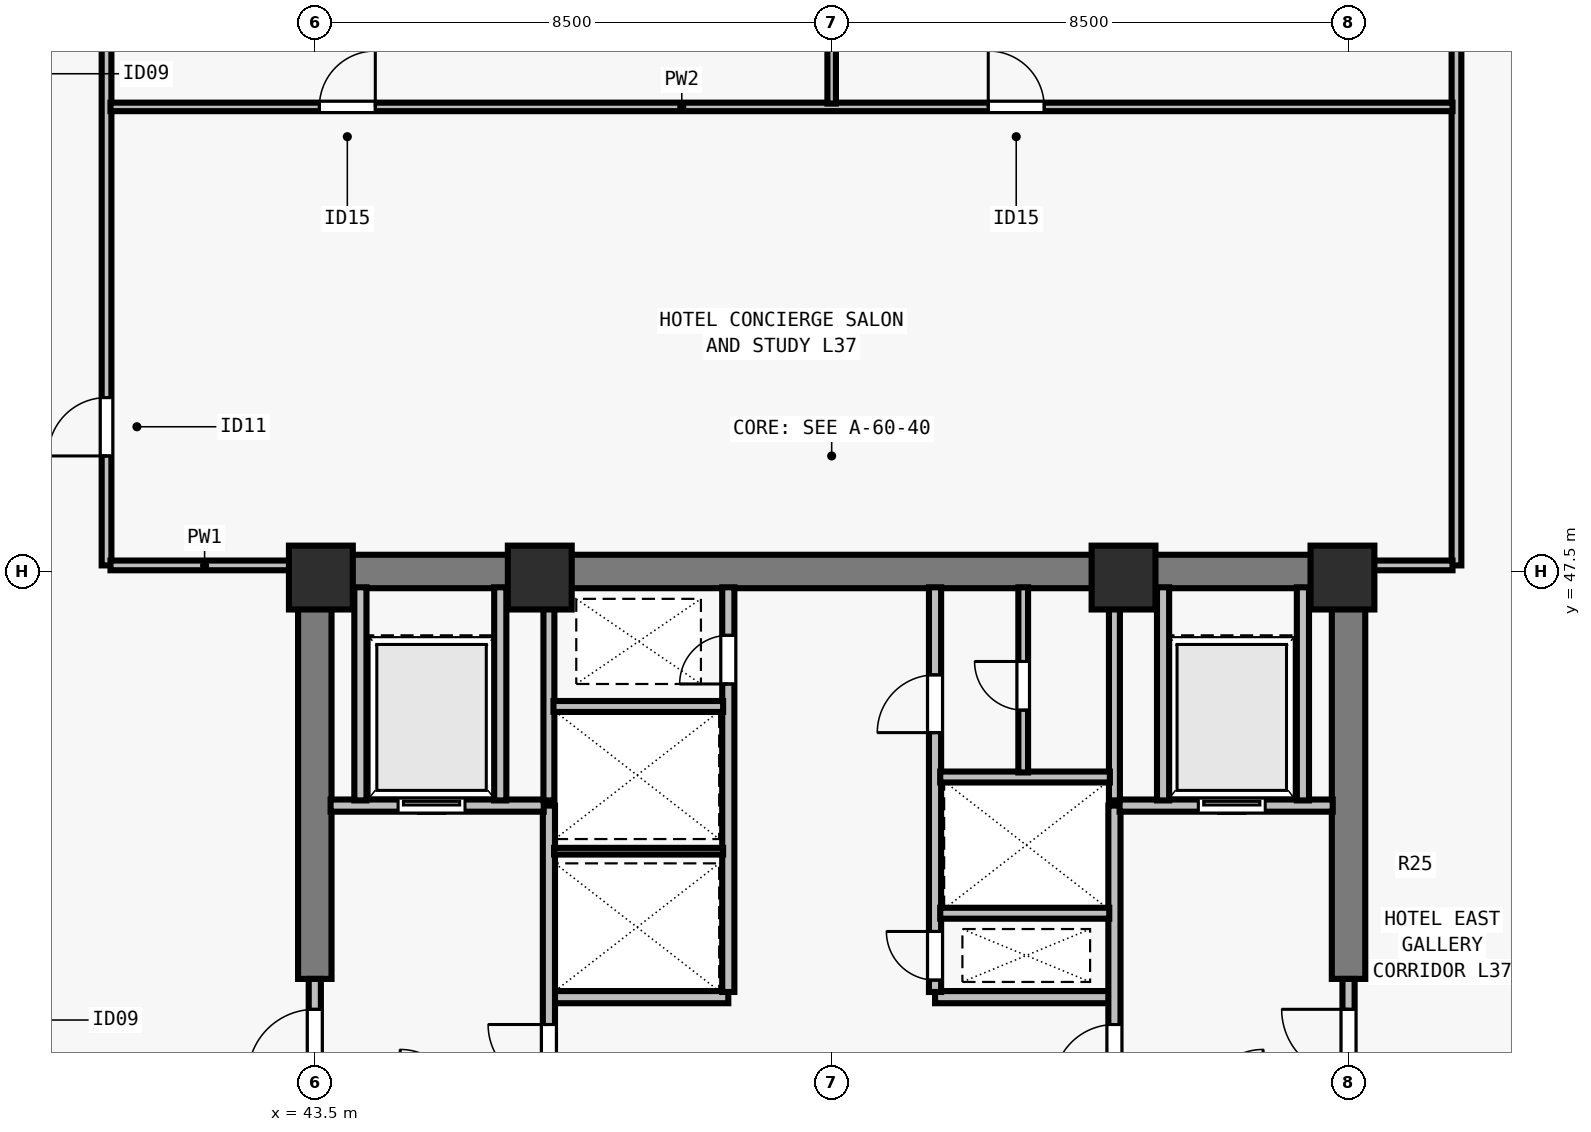
"""IFC4 building model, lengths in metres.
Left out: names, types, materials, properties, quantities, classifications, styles, units other than length and angle.
Written with IfcOpenShell. Run it as: python <this file> out.ifc"""

import sys

from ifc_helpers import new_model, si_unit, direction, frame, frame_2d, origin, origin_2d, place, context, subcontext, project, spatial, rectangle, extrude, element, fill, save


model = new_model("IFC4")
c1 = context("Model", 3, precision=1e-05, world=origin(), true_north=direction((0.0, 1.0)))
c2 = subcontext(c1, "Body", "Model", "MODEL_VIEW")
j1 = project(units=[si_unit("LENGTHUNIT", "METRE"), si_unit("PLANEANGLEUNIT", "RADIAN")], contexts=[c1])
p1 = place(None, origin())
s1 = spatial("IfcSite", under=j1, at=p1, CompositionType="ELEMENT")
p2 = place(p1, origin())
s2 = spatial("IfcBuilding", under=s1, at=p2, CompositionType="ELEMENT")
p3 = place(p2, frame((0.0, 0.0, 137.5)))
s3 = spatial("IfcBuildingStorey", under=s2, at=p3, CompositionType="ELEMENT", Elevation=137.5)
for number, where, z_axis, x_axis in (
    (1, (43.6, 47.4, 0.0), (0.0, 0.0, 1.0), (1.0, 0.0, 0.0)),
    (2, (47.2, 47.4, 0.0), (0.0, 0.0, 1.0), (1.0, 0.0, 0.0)),
    (3, (56.8, 47.4, 0.0), (0.0, 0.0, 1.0), (1.0, 0.0, 0.0)),
    (4, (60.4, 47.4, 0.0), (0.0, 0.0, 1.0), (1.0, 0.0, 0.0)),
):
    element("IfcColumn", number, at=place(p3, frame(where, z_axis=z_axis, x_axis=x_axis)), inside=s3, PredefinedType="COLUMN", context=c2, shape_type="SweptSolid", body=[
        extrude(rectangle(XDim=1.05, YDim=1.05, at=origin_2d()), origin(), (0.0, 0.0, 1.0), 3.5),
    ])
p4 = place(p3, frame((43.225, 47.5, 0.0), z_axis=(0.0, 0.0, 1.0), x_axis=(1.0, 0.0, 0.0)))
e5 = element("IfcWall", 5, at=p4, inside=s3, PredefinedType="SHEAR", context=c2, shape_type="SweptSolid", body=[
    extrude(rectangle(XDim=17.55, YDim=0.55, at=frame_2d((8.775, 0.0))), origin(), (0.0, 0.0, 1.0), 3.28),
])
for number, where, z_axis, x_axis in (
    (6, (43.5, 40.8, 0.0), (0.0, 0.0, 1.0), (0.0, 1.0, 0.0)),
    (7, (60.5, 40.8, 0.0), (0.0, 0.0, 1.0), (0.0, 1.0, 0.0)),
):
    element("IfcWall", number, at=place(p3, frame(where, z_axis=z_axis, x_axis=x_axis)), inside=s3, PredefinedType="SHEAR", context=c2, shape_type="SweptSolid", body=[
        extrude(rectangle(XDim=6.435, YDim=0.55, at=frame_2d((3.218, 0.0))), origin(), (0.0, 0.0, 1.0), 3.28),
    ])
for number, where, z_axis, x_axis in (
    (8, (47.35, 40.5, 0.0), (0.0, 0.0, 1.0), (1.0, 0.0, 0.0)),
    (9, (53.7, 40.5, 0.0), (0.0, 0.0, 1.0), (1.0, 0.0, 0.0)),
):
    element("IfcWall", number, at=place(p3, frame(where, z_axis=z_axis, x_axis=x_axis)), inside=s3, PredefinedType="SOLIDWALL", context=c2, shape_type="SweptSolid", body=[
        extrude(rectangle(XDim=2.95, YDim=0.2, at=frame_2d((1.475, 0.0))), origin(), (0.0, 0.0, 1.0), 3.28),
    ])
p5 = place(p3, frame((50.3, 40.585, 0.0), z_axis=(0.0, 0.0, 1.0), x_axis=(0.0, 1.0, 0.0)))
e10 = element("IfcWall", 10, at=p5, inside=s3, PredefinedType="SOLIDWALL", context=c2, shape_type="SweptSolid", body=[
    extrude(rectangle(XDim=6.655, YDim=0.2, at=frame_2d((3.328, 0.0))), origin(), (0.0, 0.0, 1.0), 3.28),
])
p6 = place(p5, frame((5.065, 0.0, 0.0)))
e11 = element("IfcOpeningElement", 11, at=p6, cuts=e10, PredefinedType="OPENING", context=c2, shape_type="SweptSolid", body=[
    extrude(rectangle(XDim=0.8, YDim=2.08, at=frame_2d((0.4, 1.04))), frame((0.0, 0.11, 0.0), z_axis=(0.0, -1.0, 0.0), x_axis=(1.0, 0.0, 0.0)), (0.0, 0.0, 1.0), 0.22),
])
p7 = place(p3, frame((53.7, 40.585, 0.0), z_axis=(0.0, 0.0, 1.0), x_axis=(0.0, 1.0, 0.0)))
e12 = element("IfcWall", 12, at=p7, inside=s3, PredefinedType="SOLIDWALL", context=c2, shape_type="SweptSolid", body=[
    extrude(rectangle(XDim=6.655, YDim=0.2, at=frame_2d((3.328, 0.0))), origin(), (0.0, 0.0, 1.0), 3.28),
])
p8 = place(p7, frame((0.195, 0.0, 0.0)))
e13 = element("IfcOpeningElement", 13, at=p8, cuts=e12, PredefinedType="OPENING", context=c2, shape_type="SweptSolid", body=[
    extrude(rectangle(XDim=0.8, YDim=2.08, at=frame_2d((0.4, 1.04))), frame((0.0, 0.11, 0.0), z_axis=(0.0, -1.0, 0.0), x_axis=(1.0, 0.0, 0.0)), (0.0, 0.0, 1.0), 0.22),
])
p9 = place(p7, frame((4.265, 0.0, 0.0)))
e14 = element("IfcOpeningElement", 14, at=p9, cuts=e12, PredefinedType="OPENING", context=c2, shape_type="SweptSolid", body=[
    extrude(rectangle(XDim=0.95, YDim=2.12, at=frame_2d((0.475, 1.06))), frame((0.0, 0.11, 0.0), z_axis=(0.0, -1.0, 0.0), x_axis=(1.0, 0.0, 0.0)), (0.0, 0.0, 1.0), 0.22),
])
p10 = place(p3, frame((43.5, 38.75, 0.0), z_axis=(0.0, 0.0, 1.0), x_axis=(0.0, 1.0, 0.0)))
e15 = element("IfcWall", 15, at=p10, inside=s3, PredefinedType="SOLIDWALL", context=c2, shape_type="SweptSolid", body=[
    extrude(rectangle(XDim=2.05, YDim=0.2, at=frame_2d((1.025, 0.0))), origin(), (0.0, 0.0, 1.0), 3.28),
])
p11 = place(p10, frame((0.45, 0.0, 0.0)))
e16 = element("IfcOpeningElement", 16, at=p11, cuts=e15, PredefinedType="OPENING", context=c2, shape_type="SweptSolid", body=[
    extrude(rectangle(XDim=1.1, YDim=2.15, at=frame_2d((0.55, 1.075))), frame((0.0, 0.11, 0.0), z_axis=(0.0, -1.0, 0.0), x_axis=(1.0, 0.0, 0.0)), (0.0, 0.0, 1.0), 0.22),
])
p12 = place(p3, frame((47.35, 38.785, 0.0), z_axis=(0.0, 0.0, 1.0), x_axis=(0.0, 1.0, 0.0)))
e17 = element("IfcWall", 17, at=p12, inside=s3, PredefinedType="SOLIDWALL", context=c2, shape_type="SweptSolid", body=[
    extrude(rectangle(XDim=4.865, YDim=0.2, at=frame_2d((2.433, 0.0))), origin(), (0.0, 0.0, 1.0), 3.28),
])
p13 = place(p12, frame((0.265, 0.0, 0.0)))
e18 = element("IfcOpeningElement", 18, at=p13, cuts=e17, PredefinedType="OPENING", context=c2, shape_type="SweptSolid", body=[
    extrude(rectangle(XDim=1.0, YDim=2.15, at=frame_2d((0.5, 1.075))), frame((0.0, 0.11, 0.0), z_axis=(0.0, -1.0, 0.0), x_axis=(1.0, 0.0, 0.0)), (0.0, 0.0, 1.0), 0.22),
])
p14 = place(p3, frame((43.76, 43.65, 0.0), z_axis=(0.0, 0.0, 1.0), x_axis=(1.0, 0.0, 0.0)))
e19 = element("IfcWall", 19, at=p14, inside=s3, PredefinedType="SOLIDWALL", context=c2, shape_type="SweptSolid", body=[
    extrude(rectangle(XDim=3.505, YDim=0.2, at=frame_2d((1.752, 0.0))), origin(), (0.0, 0.0, 1.0), 3.28),
])
p15 = place(p14, frame((1.11, 0.0, 0.0)))
e20 = element("IfcOpeningElement", 20, at=p15, cuts=e19, PredefinedType="OPENING", context=c2, shape_type="SweptSolid", body=[
    extrude(rectangle(XDim=1.1, YDim=2.2, at=frame_2d((0.55, 1.1))), frame((0.0, 0.11, 0.0), z_axis=(0.0, -1.0, 0.0), x_axis=(1.0, 0.0, 0.0)), (0.0, 0.0, 1.0), 0.22),
])
for number, where, z_axis, x_axis in (
    (21, (46.55, 43.735, 0.0), (0.0, 0.0, 1.0), (0.0, 1.0, 0.0)),
    (22, (44.25, 43.735, 0.0), (0.0, 0.0, 1.0), (0.0, 1.0, 0.0)),
):
    element("IfcWall", number, at=place(p3, frame(where, z_axis=z_axis, x_axis=x_axis)), inside=s3, PredefinedType="SOLIDWALL", context=c2, shape_type="SweptSolid", body=[
        extrude(rectangle(XDim=3.505, YDim=0.2, at=frame_2d((1.752, 0.0))), origin(), (0.0, 0.0, 1.0), 3.28),
    ])
p16 = place(p3, frame((60.5, 38.75, 0.0), z_axis=(0.0, 0.0, 1.0), x_axis=(0.0, 1.0, 0.0)))
e23 = element("IfcWall", 23, at=p16, inside=s3, PredefinedType="SOLIDWALL", context=c2, shape_type="SweptSolid", body=[
    extrude(rectangle(XDim=2.05, YDim=0.2, at=frame_2d((1.025, 0.0))), origin(), (0.0, 0.0, 1.0), 3.28),
])
p17 = place(p16, frame((0.45, 0.0, 0.0)))
e24 = element("IfcOpeningElement", 24, at=p17, cuts=e23, PredefinedType="OPENING", context=c2, shape_type="SweptSolid", body=[
    extrude(rectangle(XDim=1.1, YDim=2.15, at=frame_2d((0.55, 1.075))), frame((0.0, 0.11, 0.0), z_axis=(0.0, -1.0, 0.0), x_axis=(1.0, 0.0, 0.0)), (0.0, 0.0, 1.0), 0.22),
])
p18 = place(p3, frame((56.65, 38.785, 0.0), z_axis=(0.0, 0.0, 1.0), x_axis=(0.0, 1.0, 0.0)))
e25 = element("IfcWall", 25, at=p18, inside=s3, PredefinedType="SOLIDWALL", context=c2, shape_type="SweptSolid", body=[
    extrude(rectangle(XDim=4.865, YDim=0.2, at=frame_2d((2.433, 0.0))), origin(), (0.0, 0.0, 1.0), 3.28),
])
p19 = place(p18, frame((0.265, 0.0, 0.0)))
e26 = element("IfcOpeningElement", 26, at=p19, cuts=e25, PredefinedType="OPENING", context=c2, shape_type="SweptSolid", body=[
    extrude(rectangle(XDim=1.0, YDim=2.15, at=frame_2d((0.5, 1.075))), frame((0.0, 0.11, 0.0), z_axis=(0.0, -1.0, 0.0), x_axis=(1.0, 0.0, 0.0)), (0.0, 0.0, 1.0), 0.22),
])
p20 = place(p3, frame((56.735, 43.65, 0.0), z_axis=(0.0, 0.0, 1.0), x_axis=(1.0, 0.0, 0.0)))
e27 = element("IfcWall", 27, at=p20, inside=s3, PredefinedType="SOLIDWALL", context=c2, shape_type="SweptSolid", body=[
    extrude(rectangle(XDim=3.505, YDim=0.2, at=frame_2d((1.752, 0.0))), origin(), (0.0, 0.0, 1.0), 3.28),
])
p21 = place(p20, frame((1.295, 0.0, 0.0)))
e28 = element("IfcOpeningElement", 28, at=p21, cuts=e27, PredefinedType="OPENING", context=c2, shape_type="SweptSolid", body=[
    extrude(rectangle(XDim=1.1, YDim=2.2, at=frame_2d((0.55, 1.1))), frame((0.0, 0.11, 0.0), z_axis=(0.0, -1.0, 0.0), x_axis=(1.0, 0.0, 0.0)), (0.0, 0.0, 1.0), 0.22),
])
for number, where, z_axis, x_axis in (
    (29, (57.45, 43.735, 0.0), (0.0, 0.0, 1.0), (0.0, 1.0, 0.0)),
    (30, (59.75, 43.735, 0.0), (0.0, 0.0, 1.0), (0.0, 1.0, 0.0)),
):
    element("IfcWall", number, at=place(p3, frame(where, z_axis=z_axis, x_axis=x_axis)), inside=s3, PredefinedType="SOLIDWALL", context=c2, shape_type="SweptSolid", body=[
        extrude(rectangle(XDim=3.505, YDim=0.2, at=frame_2d((1.752, 0.0))), origin(), (0.0, 0.0, 1.0), 3.28),
    ])
p22 = place(p3, frame((47.35, 43.735, 0.0), z_axis=(0.0, 0.0, 1.0), x_axis=(0.0, 1.0, 0.0)))
e31 = element("IfcWall", 31, at=p22, inside=s3, PredefinedType="SOLIDWALL", context=c2, shape_type="SweptSolid", body=[
    extrude(rectangle(XDim=3.505, YDim=0.18, at=frame_2d((1.752, 0.0))), origin(), (0.0, 0.0, 1.0), 3.28),
])
p23 = place(p3, frame((47.435, 42.9, 0.0), z_axis=(0.0, 0.0, 1.0), x_axis=(1.0, 0.0, 0.0)))
e32 = element("IfcWall", 32, at=p23, inside=s3, PredefinedType="PARTITIONING", context=c2, shape_type="SweptSolid", body=[
    extrude(rectangle(XDim=2.78, YDim=0.11, at=frame_2d((1.39, 0.0))), origin(), (0.0, 0.0, 1.0), 3.28),
])
p24 = place(p3, frame((47.425, 45.28, 0.0), z_axis=(0.0, 0.0, 1.0), x_axis=(1.0, 0.0, 0.0)))
e33 = element("IfcWall", 33, at=p24, inside=s3, PredefinedType="SOLIDWALL", context=c2, shape_type="SweptSolid", body=[
    extrude(rectangle(XDim=2.79, YDim=0.18, at=frame_2d((1.395, 0.0))), origin(), (0.0, 0.0, 1.0), 3.28),
])
p25 = place(p3, frame((56.65, 43.735, 0.0), z_axis=(0.0, 0.0, 1.0), x_axis=(0.0, 1.0, 0.0)))
e34 = element("IfcWall", 34, at=p25, inside=s3, PredefinedType="SOLIDWALL", context=c2, shape_type="SweptSolid", body=[
    extrude(rectangle(XDim=3.505, YDim=0.18, at=frame_2d((1.752, 0.0))), origin(), (0.0, 0.0, 1.0), 3.28),
])
p26 = place(p3, frame((53.785, 41.88, 0.0), z_axis=(0.0, 0.0, 1.0), x_axis=(1.0, 0.0, 0.0)))
e35 = element("IfcWall", 35, at=p26, inside=s3, PredefinedType="SOLIDWALL", context=c2, shape_type="SweptSolid", body=[
    extrude(rectangle(XDim=2.78, YDim=0.18, at=frame_2d((1.39, 0.0))), origin(), (0.0, 0.0, 1.0), 3.28),
])
p27 = place(p3, frame((53.785, 44.12, 0.0), z_axis=(0.0, 0.0, 1.0), x_axis=(1.0, 0.0, 0.0)))
e36 = element("IfcWall", 36, at=p27, inside=s3, PredefinedType="SOLIDWALL", context=c2, shape_type="SweptSolid", body=[
    extrude(rectangle(XDim=2.79, YDim=0.18, at=frame_2d((1.395, 0.0))), origin(), (0.0, 0.0, 1.0), 3.28),
])
p28 = place(p3, frame((55.15, 44.195, 0.0), z_axis=(0.0, 0.0, 1.0), x_axis=(0.0, 1.0, 0.0)))
e37 = element("IfcWall", 37, at=p28, inside=s3, PredefinedType="PARTITIONING", context=c2, shape_type="SweptSolid", body=[
    extrude(rectangle(XDim=3.045, YDim=0.16, at=frame_2d((1.522, 0.0))), origin(), (0.0, 0.0, 1.0), 3.28),
])
p29 = place(p28, frame((1.025, 0.0, 0.0)))
e38 = element("IfcOpeningElement", 38, at=p29, cuts=e37, PredefinedType="OPENING", context=c2, shape_type="SweptSolid", body=[
    extrude(rectangle(XDim=0.8, YDim=2.1, at=frame_2d((0.4, 1.05))), frame((0.0, 0.09, 0.0), z_axis=(0.0, -1.0, 0.0), x_axis=(1.0, 0.0, 0.0)), (0.0, 0.0, 1.0), 0.18),
])
p30 = place(p3, frame((40.075, 47.6, 0.0), z_axis=(0.0, 0.0, 1.0), x_axis=(0.0, 1.0, 0.0)))
e39 = element("IfcWall", 39, at=p30, inside=s3, PredefinedType="PARTITIONING", context=c2, shape_type="SweptSolid", body=[
    extrude(rectangle(XDim=15.075, YDim=0.16, at=frame_2d((7.538, 0.0))), origin(), (0.0, 0.0, 1.0), 2.555),
])
p31 = place(p30, frame((1.8, 0.0, 0.0)))
e40 = element("IfcOpeningElement", 40, at=p31, cuts=e39, PredefinedType="OPENING", context=c2, shape_type="SweptSolid", body=[
    extrude(rectangle(XDim=0.96, YDim=2.12, at=frame_2d((0.48, 1.06))), frame((0.0, 0.09, 0.0), z_axis=(0.0, -1.0, 0.0), x_axis=(1.0, 0.0, 0.0)), (0.0, 0.0, 1.0), 0.18),
])
p32 = place(p3, frame((40.14, 47.6, 0.0), z_axis=(0.0, 0.0, 1.0), x_axis=(1.0, 0.0, 0.0)))
e41 = element("IfcWall", 41, at=p32, inside=s3, PredefinedType="PARTITIONING", context=c2, shape_type="SweptSolid", body=[
    extrude(rectangle(XDim=3.095, YDim=0.16, at=frame_2d((1.548, 0.0))), origin(), (0.0, 0.0, 1.0), 3.28),
])
p33 = place(p3, frame((62.275, 47.6, 0.0), z_axis=(0.0, 0.0, 1.0), x_axis=(0.0, 1.0, 0.0)))
e42 = element("IfcWall", 42, at=p33, inside=s3, PredefinedType="PARTITIONING", context=c2, shape_type="SweptSolid", body=[
    extrude(rectangle(XDim=15.075, YDim=0.16, at=frame_2d((7.538, 0.0))), origin(), (0.0, 0.0, 1.0), 2.555),
])
p34 = place(p3, frame((60.765, 47.6, 0.0), z_axis=(0.0, 0.0, 1.0), x_axis=(1.0, 0.0, 0.0)))
e43 = element("IfcWall", 43, at=p34, inside=s3, PredefinedType="PARTITIONING", context=c2, shape_type="SweptSolid", body=[
    extrude(rectangle(XDim=1.445, YDim=0.16, at=frame_2d((0.723, 0.0))), origin(), (0.0, 0.0, 1.0), 3.28),
])
p35 = place(p3, frame((40.14, 55.14, 0.0), z_axis=(0.0, 0.0, 1.0), x_axis=(1.0, 0.0, 0.0)))
e44 = element("IfcWall", 44, at=p35, inside=s3, PredefinedType="PARTITIONING", context=c2, shape_type="SweptSolid", body=[
    extrude(rectangle(XDim=22.07, YDim=0.14, at=frame_2d((11.035, 0.0))), origin(), (0.0, 0.0, 1.0), 3.28),
])
p36 = place(p35, frame((3.435, 0.0, 0.0)))
e45 = element("IfcOpeningElement", 45, at=p36, cuts=e44, PredefinedType="OPENING", context=c2, shape_type="SweptSolid", body=[
    extrude(rectangle(XDim=0.92, YDim=2.12, at=frame_2d((0.46, 1.06))), frame((0.0, 0.08, 0.0), z_axis=(0.0, -1.0, 0.0), x_axis=(1.0, 0.0, 0.0)), (0.0, 0.0, 1.0), 0.16),
])
p37 = place(p35, frame((14.435, 0.0, 0.0)))
e46 = element("IfcOpeningElement", 46, at=p37, cuts=e44, PredefinedType="OPENING", context=c2, shape_type="SweptSolid", body=[
    extrude(rectangle(XDim=0.92, YDim=2.12, at=frame_2d((0.46, 1.06))), frame((0.0, 0.08, 0.0), z_axis=(0.0, -1.0, 0.0), x_axis=(1.0, 0.0, 0.0)), (0.0, 0.0, 1.0), 0.16),
])
p38 = place(p3, frame((52.0, 55.195, 0.0), z_axis=(0.0, 0.0, 1.0), x_axis=(0.0, 1.0, 0.0)))
e47 = element("IfcWall", 47, at=p38, inside=s3, PredefinedType="PARTITIONING", context=c2, shape_type="SweptSolid", body=[
    extrude(rectangle(XDim=7.48, YDim=0.14, at=frame_2d((3.74, 0.0))), origin(), (0.0, 0.0, 1.0), 3.28),
])
p39 = place(p11, origin())
e48 = element("IfcDoor", 48, at=p39, inside=s3, OperationType="SINGLE_SWING_LEFT", PredefinedType="DOOR", context=c2, shape_type="SweptSolid", body=[
    extrude(rectangle(XDim=1.1, YDim=2.15, at=frame_2d((0.55, 1.075))), frame((0.0, 0.025, 0.0), z_axis=(0.0, -1.0, 0.0), x_axis=(1.0, 0.0, 0.0)), (0.0, 0.0, 1.0), 0.05),
])
fill(e16, e48)
p40 = place(p13, origin())
e49 = element("IfcDoor", 49, at=p40, inside=s3, OperationType="SINGLE_SWING_RIGHT", PredefinedType="DOOR", context=c2, shape_type="SweptSolid", body=[
    extrude(rectangle(XDim=1.0, YDim=2.15, at=frame_2d((0.5, 1.075))), frame((0.0, 0.025, 0.0), z_axis=(0.0, -1.0, 0.0), x_axis=(1.0, 0.0, 0.0)), (0.0, 0.0, 1.0), 0.05),
])
fill(e18, e49)
p41 = place(p15, origin())
e50 = element("IfcDoor", 50, at=p41, inside=s3, OperationType="SLIDING_TO_LEFT", PredefinedType="DOOR", context=c2, shape_type="SweptSolid", body=[
    extrude(rectangle(XDim=1.1, YDim=2.2, at=frame_2d((0.55, 1.1))), frame((0.0, 0.025, 0.0), z_axis=(0.0, -1.0, 0.0), x_axis=(1.0, 0.0, 0.0)), (0.0, 0.0, 1.0), 0.05),
])
fill(e20, e50)
p42 = place(p17, origin())
e51 = element("IfcDoor", 51, at=p42, inside=s3, OperationType="SINGLE_SWING_RIGHT", PredefinedType="DOOR", context=c2, shape_type="SweptSolid", body=[
    extrude(rectangle(XDim=1.1, YDim=2.15, at=frame_2d((0.55, 1.075))), frame((0.0, 0.025, 0.0), z_axis=(0.0, -1.0, 0.0), x_axis=(1.0, 0.0, 0.0)), (0.0, 0.0, 1.0), 0.05),
])
fill(e24, e51)
p43 = place(p19, origin())
e52 = element("IfcDoor", 52, at=p43, inside=s3, OperationType="SINGLE_SWING_LEFT", PredefinedType="DOOR", context=c2, shape_type="SweptSolid", body=[
    extrude(rectangle(XDim=1.0, YDim=2.15, at=frame_2d((0.5, 1.075))), frame((0.0, 0.025, 0.0), z_axis=(0.0, -1.0, 0.0), x_axis=(1.0, 0.0, 0.0)), (0.0, 0.0, 1.0), 0.05),
])
fill(e26, e52)
p44 = place(p21, origin())
e53 = element("IfcDoor", 53, at=p44, inside=s3, OperationType="SLIDING_TO_LEFT", PredefinedType="DOOR", context=c2, shape_type="SweptSolid", body=[
    extrude(rectangle(XDim=1.1, YDim=2.2, at=frame_2d((0.55, 1.1))), frame((0.0, 0.025, 0.0), z_axis=(0.0, -1.0, 0.0), x_axis=(1.0, 0.0, 0.0)), (0.0, 0.0, 1.0), 0.05),
])
fill(e28, e53)
p45 = place(p6, origin())
e54 = element("IfcDoor", 54, at=p45, inside=s3, OperationType="SINGLE_SWING_LEFT", PredefinedType="DOOR", context=c2, shape_type="SweptSolid", body=[
    extrude(rectangle(XDim=0.8, YDim=2.08, at=frame_2d((0.4, 1.04))), frame((0.0, 0.025, 0.0), z_axis=(0.0, -1.0, 0.0), x_axis=(1.0, 0.0, 0.0)), (0.0, 0.0, 1.0), 0.05),
])
fill(e11, e54)
p46 = place(p8, origin())
e55 = element("IfcDoor", 55, at=p46, inside=s3, OperationType="SINGLE_SWING_RIGHT", PredefinedType="DOOR", context=c2, shape_type="SweptSolid", body=[
    extrude(rectangle(XDim=0.8, YDim=2.08, at=frame_2d((0.4, 1.04))), frame((0.0, 0.025, 0.0), z_axis=(0.0, -1.0, 0.0), x_axis=(1.0, 0.0, 0.0)), (0.0, 0.0, 1.0), 0.05),
])
fill(e13, e55)
p47 = place(p9, origin())
e56 = element("IfcDoor", 56, at=p47, inside=s3, OperationType="SINGLE_SWING_LEFT", PredefinedType="DOOR", context=c2, shape_type="SweptSolid", body=[
    extrude(rectangle(XDim=0.95, YDim=2.12, at=frame_2d((0.475, 1.06))), frame((0.0, 0.025, 0.0), z_axis=(0.0, -1.0, 0.0), x_axis=(1.0, 0.0, 0.0)), (0.0, 0.0, 1.0), 0.05),
])
fill(e14, e56)
p48 = place(p29, origin())
e57 = element("IfcDoor", 57, at=p48, inside=s3, OperationType="SINGLE_SWING_RIGHT", PredefinedType="DOOR", context=c2, shape_type="SweptSolid", body=[
    extrude(rectangle(XDim=0.8, YDim=2.1, at=frame_2d((0.4, 1.05))), frame((0.0, 0.025, 0.0), z_axis=(0.0, -1.0, 0.0), x_axis=(1.0, 0.0, 0.0)), (0.0, 0.0, 1.0), 0.05),
])
fill(e38, e57)
p49 = place(p31, origin())
e58 = element("IfcDoor", 58, at=p49, inside=s3, OperationType="SINGLE_SWING_LEFT", PredefinedType="DOOR", context=c2, shape_type="SweptSolid", body=[
    extrude(rectangle(XDim=0.96, YDim=2.12, at=frame_2d((0.48, 1.06))), frame((0.0, 0.025, 0.0), z_axis=(0.0, -1.0, 0.0), x_axis=(1.0, 0.0, 0.0)), (0.0, 0.0, 1.0), 0.05),
])
fill(e40, e58)
p50 = place(p36, origin())
e59 = element("IfcDoor", 59, at=p50, inside=s3, OperationType="SINGLE_SWING_RIGHT", PredefinedType="DOOR", context=c2, shape_type="SweptSolid", body=[
    extrude(rectangle(XDim=0.92, YDim=2.12, at=frame_2d((0.46, 1.06))), frame((0.0, 0.025, 0.0), z_axis=(0.0, -1.0, 0.0), x_axis=(1.0, 0.0, 0.0)), (0.0, 0.0, 1.0), 0.05),
])
fill(e45, e59)
p51 = place(p37, origin())
e60 = element("IfcDoor", 60, at=p51, inside=s3, OperationType="SINGLE_SWING_LEFT", PredefinedType="DOOR", context=c2, shape_type="SweptSolid", body=[
    extrude(rectangle(XDim=0.92, YDim=2.12, at=frame_2d((0.46, 1.06))), frame((0.0, 0.025, 0.0), z_axis=(0.0, -1.0, 0.0), x_axis=(1.0, 0.0, 0.0)), (0.0, 0.0, 1.0), 0.05),
])
fill(e46, e60)
save(model, sys.argv[1])
